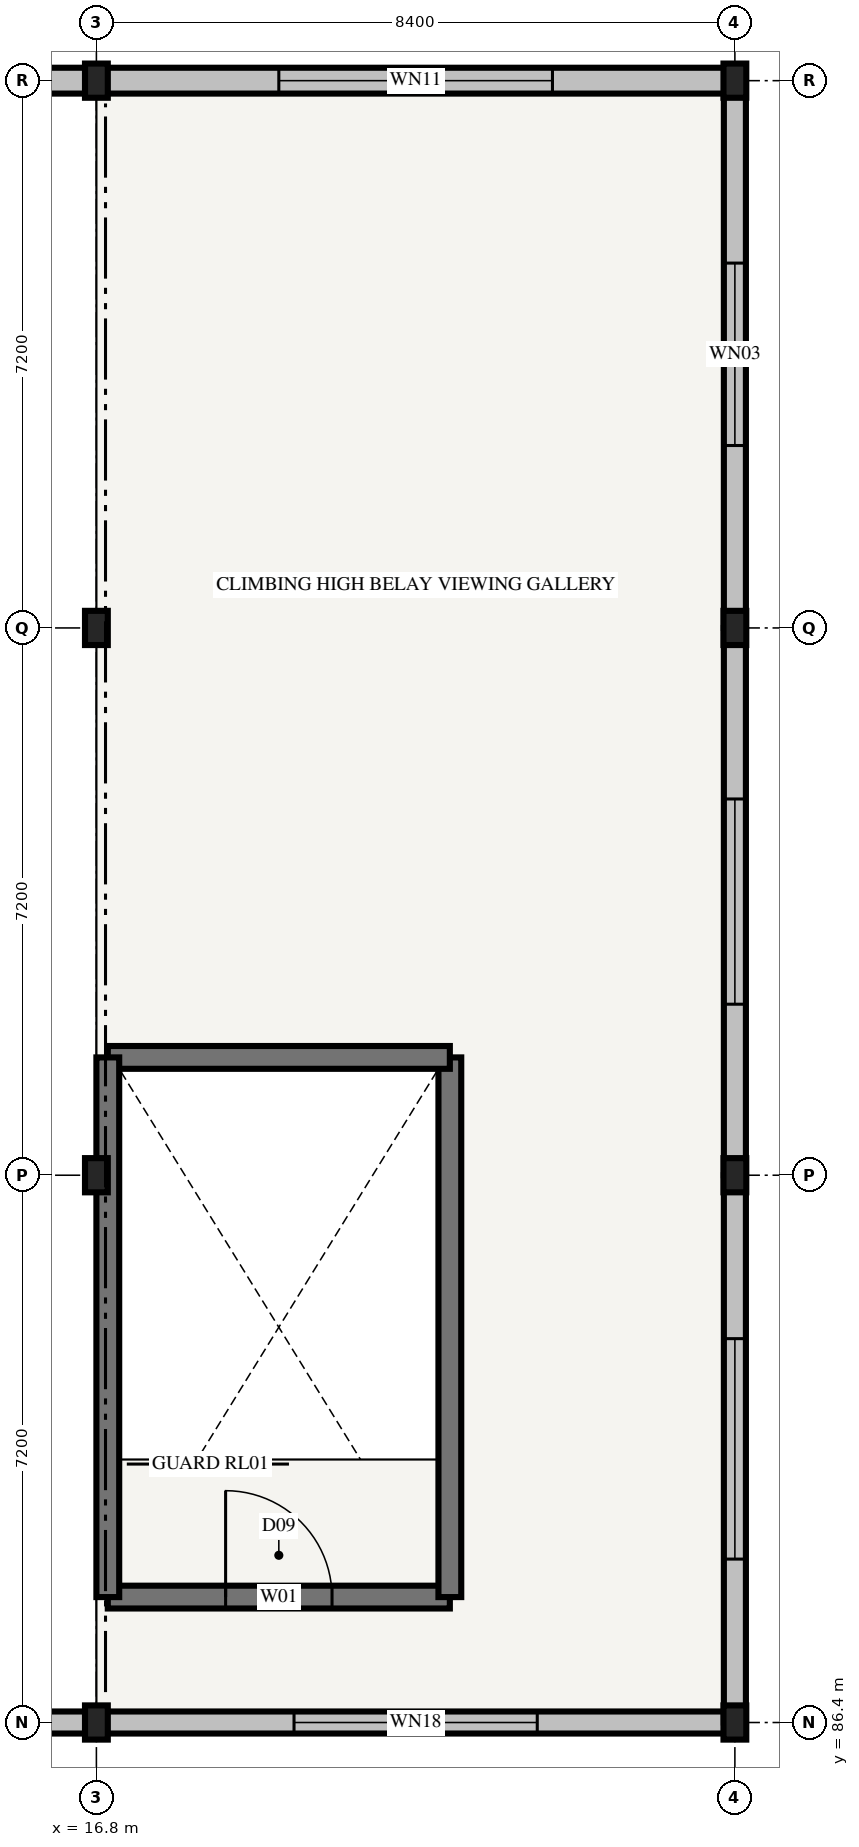
"""IFC4 building model, lengths in metres.
Left out: names, types, materials, properties, quantities, classifications, styles, units other than length and angle.
Written with IfcOpenShell. Run it as: python <this file> out.ifc"""

import sys

from ifc_helpers import new_model, si_unit, direction, frame, frame_2d, origin, origin_2d, place, context, subcontext, project, spatial, rectangle, i_section, extrude, element, fill, save


model = new_model("IFC4")
c1 = context("Model", 3, precision=1e-05, world=origin(), true_north=direction((0.0, 1.0)))
c2 = subcontext(c1, "Body", "Model", "MODEL_VIEW")
j1 = project(units=[si_unit("LENGTHUNIT", "METRE"), si_unit("PLANEANGLEUNIT", "RADIAN")], contexts=[c1])
p1 = place(None, origin())
s1 = spatial("IfcSite", under=j1, at=p1, CompositionType="ELEMENT")
p2 = place(p1, origin())
s2 = spatial("IfcBuilding", under=s1, at=p2, CompositionType="ELEMENT")
p3 = place(p2, frame((0.0, 0.0, 12.9)))
s3 = spatial("IfcBuildingStorey", under=s2, at=p3, CompositionType="ELEMENT", Elevation=12.9)
for number, where, z_axis, x_axis in (
    (1, (16.8, 86.4, 0.0), (0.0, 0.0, 1.0), (1.0, 0.0, 0.0)),
    (2, (16.8, 93.6, 0.0), (0.0, 0.0, 1.0), (1.0, 0.0, 0.0)),
    (3, (16.8, 100.8, 0.0), (0.0, 0.0, 1.0), (1.0, 0.0, 0.0)),
    (4, (16.8, 108.0, 0.0), (0.0, 0.0, 1.0), (1.0, 0.0, 0.0)),
    (5, (25.2, 86.4, 0.0), (0.0, 0.0, 1.0), (1.0, 0.0, 0.0)),
    (6, (25.2, 93.6, 0.0), (0.0, 0.0, 1.0), (1.0, 0.0, 0.0)),
    (7, (25.2, 100.8, 0.0), (0.0, 0.0, 1.0), (1.0, 0.0, 0.0)),
    (8, (25.2, 108.0, 0.0), (0.0, 0.0, 1.0), (1.0, 0.0, 0.0)),
):
    element("IfcColumn", number, at=place(p3, frame(where, z_axis=z_axis, x_axis=x_axis)), inside=s3, PredefinedType="COLUMN", context=c2, shape_type="SweptSolid", body=[
        extrude(i_section(OverallWidth=0.3, OverallDepth=0.45, WebThickness=0.014, FlangeThickness=0.026, FilletRadius=0.027, at=origin_2d()), origin(), (0.0, 0.0, 1.0), 4.2),
    ])
p4 = place(p3, frame((8.4, 86.4, 0.0), z_axis=(0.0, 0.0, 1.0), x_axis=(1.0, 0.0, 0.0)))
e9 = element("IfcWall", 9, at=p4, inside=s3, PredefinedType="STANDARD", context=c2, shape_type="SweptSolid", body=[
    extrude(rectangle(XDim=8.4, YDim=0.29, at=frame_2d((4.2, 0.0))), origin(), (0.0, 0.0, 1.0), 3.345),
])
p5 = place(p4, frame((3.4, 0.0, 0.85)))
e10 = element("IfcOpeningElement", 10, at=p5, cuts=e9, PredefinedType="OPENING", context=c2, shape_type="SweptSolid", body=[
    extrude(rectangle(XDim=1.6, YDim=1.4, at=frame_2d((0.8, 0.7))), frame((0.0, 0.17, 0.0), z_axis=(0.0, -1.0, 0.0), x_axis=(1.0, 0.0, 0.0)), (0.0, 0.0, 1.0), 0.34),
])
p6 = place(p3, frame((16.8, 86.4, 0.0), z_axis=(0.0, 0.0, 1.0), x_axis=(1.0, 0.0, 0.0)))
e11 = element("IfcWall", 11, at=p6, inside=s3, PredefinedType="STANDARD", context=c2, shape_type="SweptSolid", body=[
    extrude(rectangle(XDim=8.4, YDim=0.29, at=frame_2d((4.2, 0.0))), origin(), (0.0, 0.0, 1.0), 3.345),
])
p7 = place(p6, frame((2.6, 0.0, 0.85)))
e12 = element("IfcOpeningElement", 12, at=p7, cuts=e11, PredefinedType="OPENING", context=c2, shape_type="SweptSolid", body=[
    extrude(rectangle(XDim=3.2, YDim=2.0, at=frame_2d((1.6, 1.0))), frame((0.0, 0.17, 0.0), z_axis=(0.0, -1.0, 0.0), x_axis=(1.0, 0.0, 0.0)), (0.0, 0.0, 1.0), 0.34),
])
p8 = place(p3, frame((25.2, 86.4, 0.0), z_axis=(0.0, 0.0, 1.0), x_axis=(0.0, 1.0, 0.0)))
e13 = element("IfcWall", 13, at=p8, inside=s3, PredefinedType="STANDARD", context=c2, shape_type="SweptSolid", body=[
    extrude(rectangle(XDim=7.2, YDim=0.29, at=frame_2d((3.6, 0.0))), origin(), (0.0, 0.0, 1.0), 3.345),
])
p9 = place(p8, frame((2.15, 0.0, 0.85)))
e14 = element("IfcOpeningElement", 14, at=p9, cuts=e13, PredefinedType="OPENING", context=c2, shape_type="SweptSolid", body=[
    extrude(rectangle(XDim=2.9, YDim=1.9, at=frame_2d((1.45, 0.95))), frame((0.0, 0.17, 0.0), z_axis=(0.0, -1.0, 0.0), x_axis=(1.0, 0.0, 0.0)), (0.0, 0.0, 1.0), 0.34),
])
p10 = place(p3, frame((25.2, 93.6, 0.0), z_axis=(0.0, 0.0, 1.0), x_axis=(0.0, 1.0, 0.0)))
e15 = element("IfcWall", 15, at=p10, inside=s3, PredefinedType="STANDARD", context=c2, shape_type="SweptSolid", body=[
    extrude(rectangle(XDim=7.2, YDim=0.29, at=frame_2d((3.6, 0.0))), origin(), (0.0, 0.0, 1.0), 3.445),
])
p11 = place(p10, frame((2.25, 0.0, 0.85)))
e16 = element("IfcOpeningElement", 16, at=p11, cuts=e15, PredefinedType="OPENING", context=c2, shape_type="SweptSolid", body=[
    extrude(rectangle(XDim=2.7, YDim=1.75, at=frame_2d((1.35, 0.875))), frame((0.0, 0.17, 0.0), z_axis=(0.0, -1.0, 0.0), x_axis=(1.0, 0.0, 0.0)), (0.0, 0.0, 1.0), 0.34),
])
p12 = place(p3, frame((25.2, 100.8, 0.0), z_axis=(0.0, 0.0, 1.0), x_axis=(0.0, 1.0, 0.0)))
e17 = element("IfcWall", 17, at=p12, inside=s3, PredefinedType="STANDARD", context=c2, shape_type="SweptSolid", body=[
    extrude(rectangle(XDim=7.2, YDim=0.29, at=frame_2d((3.6, 0.0))), origin(), (0.0, 0.0, 1.0), 3.445),
])
p13 = place(p12, frame((2.4, 0.0, 0.85)))
e18 = element("IfcOpeningElement", 18, at=p13, cuts=e17, PredefinedType="OPENING", context=c2, shape_type="SweptSolid", body=[
    extrude(rectangle(XDim=2.4, YDim=2.4, at=frame_2d((1.2, 1.2))), frame((0.0, 0.17, 0.0), z_axis=(0.0, -1.0, 0.0), x_axis=(1.0, 0.0, 0.0)), (0.0, 0.0, 1.0), 0.34),
])
p14 = place(p3, frame((25.2, 108.0, 0.0), z_axis=(0.0, 0.0, 1.0), x_axis=(-1.0, 0.0, 0.0)))
e19 = element("IfcWall", 19, at=p14, inside=s3, PredefinedType="STANDARD", context=c2, shape_type="SweptSolid", body=[
    extrude(rectangle(XDim=8.4, YDim=0.34, at=frame_2d((4.2, 0.0))), origin(), (0.0, 0.0, 1.0), 3.445),
])
p15 = place(p14, frame((2.4, 0.0, 1.6)))
e20 = element("IfcOpeningElement", 20, at=p15, cuts=e19, PredefinedType="OPENING", context=c2, shape_type="SweptSolid", body=[
    extrude(rectangle(XDim=3.6, YDim=1.5, at=frame_2d((1.8, 0.75))), frame((0.0, 0.195, 0.0), z_axis=(0.0, -1.0, 0.0), x_axis=(1.0, 0.0, 0.0)), (0.0, 0.0, 1.0), 0.39),
])
p16 = place(p3, frame((16.8, 108.0, 0.0), z_axis=(0.0, 0.0, 1.0), x_axis=(-1.0, 0.0, 0.0)))
e21 = element("IfcWall", 21, at=p16, inside=s3, PredefinedType="STANDARD", context=c2, shape_type="SweptSolid", body=[
    extrude(rectangle(XDim=8.4, YDim=0.34, at=frame_2d((4.2, 0.0))), origin(), (0.0, 0.0, 1.0), 3.555),
])
p17 = place(p16, frame((2.4, 0.0, 1.6)))
e22 = element("IfcOpeningElement", 22, at=p17, cuts=e21, PredefinedType="OPENING", context=c2, shape_type="SweptSolid", body=[
    extrude(rectangle(XDim=3.6, YDim=1.5, at=frame_2d((1.8, 0.75))), frame((0.0, 0.195, 0.0), z_axis=(0.0, -1.0, 0.0), x_axis=(1.0, 0.0, 0.0)), (0.0, 0.0, 1.0), 0.39),
])
p18 = place(p3, frame((16.95, 88.05, 0.0), z_axis=(0.0, 0.0, 1.0), x_axis=(1.0, 0.0, 0.0)))
e23 = element("IfcWall", 23, at=p18, inside=s3, PredefinedType="SHEAR", context=c2, shape_type="SweptSolid", body=[
    extrude(rectangle(XDim=4.5, YDim=0.3, at=frame_2d((2.25, 0.0))), origin(), (0.0, 0.0, 1.0), 4.56),
])
p19 = place(p18, frame((1.55, 0.0, 0.0)))
e24 = element("IfcOpeningElement", 24, at=p19, cuts=e23, PredefinedType="OPENING", context=c2, shape_type="SweptSolid", body=[
    extrude(rectangle(XDim=1.4, YDim=2.2, at=frame_2d((0.7, 1.1))), frame((0.0, 0.175, 0.0), z_axis=(0.0, -1.0, 0.0), x_axis=(1.0, 0.0, 0.0)), (0.0, 0.0, 1.0), 0.35),
])
p20 = place(p3, frame((21.45, 88.05, 0.0), z_axis=(0.0, 0.0, 1.0), x_axis=(0.0, 1.0, 0.0)))
e25 = element("IfcWall", 25, at=p20, inside=s3, PredefinedType="SHEAR", context=c2, shape_type="SweptSolid", body=[
    extrude(rectangle(XDim=7.1, YDim=0.3, at=frame_2d((3.55, 0.0))), origin(), (0.0, 0.0, 1.0), 4.56),
])
p21 = place(p3, frame((21.45, 95.15, 0.0), z_axis=(0.0, 0.0, 1.0), x_axis=(-1.0, 0.0, 0.0)))
e26 = element("IfcWall", 26, at=p21, inside=s3, PredefinedType="SHEAR", context=c2, shape_type="SweptSolid", body=[
    extrude(rectangle(XDim=4.5, YDim=0.3, at=frame_2d((2.25, 0.0))), origin(), (0.0, 0.0, 1.0), 4.56),
])
p22 = place(p3, frame((16.95, 95.15, 0.0), z_axis=(0.0, 0.0, 1.0), x_axis=(0.0, -1.0, 0.0)))
e27 = element("IfcWall", 27, at=p22, inside=s3, PredefinedType="SHEAR", context=c2, shape_type="SweptSolid", body=[
    extrude(rectangle(XDim=7.1, YDim=0.3, at=frame_2d((3.55, 0.0))), origin(), (0.0, 0.0, 1.0), 4.56),
])
p23 = place(p7, origin())
e28 = element("IfcWindow", 28, at=p23, inside=s3, PartitioningType="SINGLE_PANEL", PredefinedType="WINDOW", context=c2, shape_type="SweptSolid", body=[
    extrude(rectangle(XDim=3.2, YDim=2.0, at=frame_2d((1.6, 1.0))), frame((0.0, 0.03, 0.0), z_axis=(0.0, -1.0, 0.0), x_axis=(1.0, 0.0, 0.0)), (0.0, 0.0, 1.0), 0.06),
])
fill(e12, e28)
p24 = place(p9, origin())
e29 = element("IfcWindow", 29, at=p24, inside=s3, PartitioningType="SINGLE_PANEL", PredefinedType="WINDOW", context=c2, shape_type="SweptSolid", body=[
    extrude(rectangle(XDim=2.9, YDim=1.9, at=frame_2d((1.45, 0.95))), frame((0.0, 0.03, 0.0), z_axis=(0.0, -1.0, 0.0), x_axis=(1.0, 0.0, 0.0)), (0.0, 0.0, 1.0), 0.06),
])
fill(e14, e29)
p25 = place(p11, origin())
e30 = element("IfcWindow", 30, at=p25, inside=s3, PartitioningType="SINGLE_PANEL", PredefinedType="WINDOW", context=c2, shape_type="SweptSolid", body=[
    extrude(rectangle(XDim=2.7, YDim=1.75, at=frame_2d((1.35, 0.875))), frame((0.0, 0.03, 0.0), z_axis=(0.0, -1.0, 0.0), x_axis=(1.0, 0.0, 0.0)), (0.0, 0.0, 1.0), 0.06),
])
fill(e16, e30)
p26 = place(p13, origin())
e31 = element("IfcWindow", 31, at=p26, inside=s3, PartitioningType="SINGLE_PANEL", PredefinedType="WINDOW", context=c2, shape_type="SweptSolid", body=[
    extrude(rectangle(XDim=2.4, YDim=2.4, at=frame_2d((1.2, 1.2))), frame((0.0, 0.03, 0.0), z_axis=(0.0, -1.0, 0.0), x_axis=(1.0, 0.0, 0.0)), (0.0, 0.0, 1.0), 0.06),
])
fill(e18, e31)
p27 = place(p15, origin())
e32 = element("IfcWindow", 32, at=p27, inside=s3, PartitioningType="SINGLE_PANEL", PredefinedType="WINDOW", context=c2, shape_type="SweptSolid", body=[
    extrude(rectangle(XDim=3.6, YDim=1.5, at=frame_2d((1.8, 0.75))), frame((0.0, 0.03, 0.0), z_axis=(0.0, -1.0, 0.0), x_axis=(1.0, 0.0, 0.0)), (0.0, 0.0, 1.0), 0.06),
])
fill(e20, e32)
p28 = place(p19, frame((1.4, 0.0, 0.0), z_axis=(0.0, 0.0, 1.0), x_axis=(-1.0, 0.0, 0.0)))
e33 = element("IfcDoor", 33, at=p28, inside=s3, OperationType="SINGLE_SWING_LEFT", PredefinedType="DOOR", context=c2, shape_type="SweptSolid", body=[
    extrude(rectangle(XDim=1.4, YDim=2.2, at=frame_2d((0.7, 1.1))), frame((0.0, 0.025, 0.0), z_axis=(0.0, -1.0, 0.0), x_axis=(1.0, 0.0, 0.0)), (0.0, 0.0, 1.0), 0.05),
])
fill(e24, e33)
save(model, sys.argv[1])
